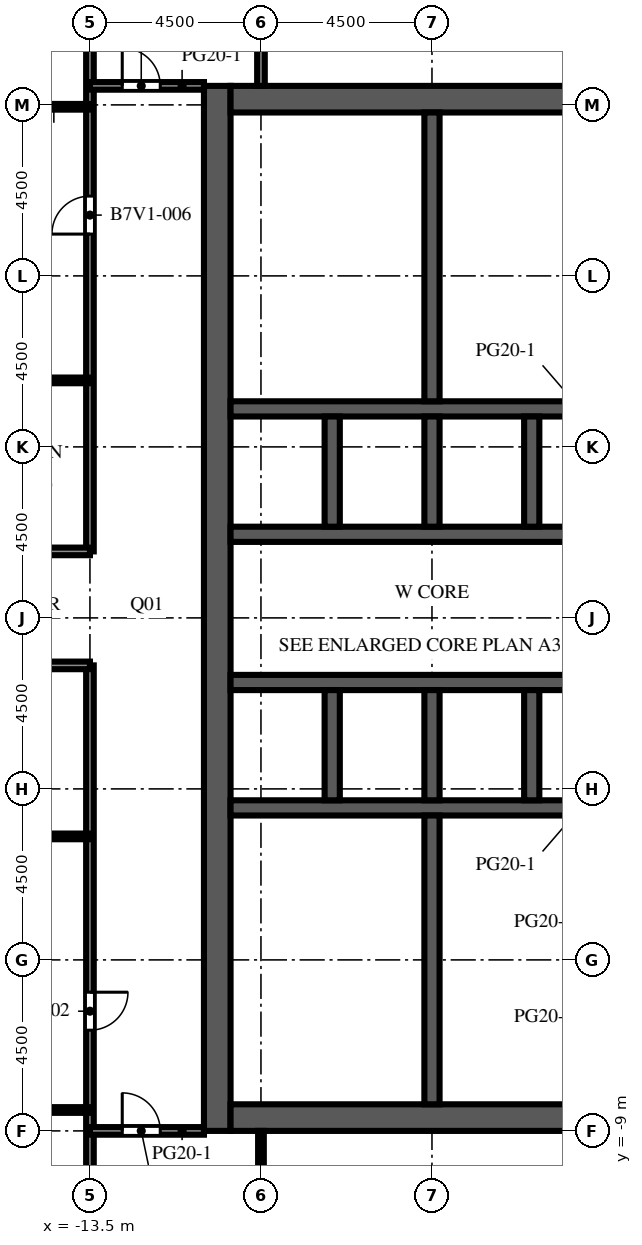
"""IFC4 building model, lengths in metres.
Left out: names, types, materials, properties, quantities, classifications, styles, units other than length and angle.
Written with IfcOpenShell. Run it as: python <this file> out.ifc"""

import sys

from ifc_helpers import new_model, si_unit, direction, frame, frame_2d, origin, place, context, subcontext, project, spatial, rectangle, extrude, element, fill, save


model = new_model("IFC4")
c1 = context("Model", 3, precision=1e-05, world=origin(), true_north=direction((0.0, 1.0)))
c2 = subcontext(c1, "Body", "Model", "MODEL_VIEW")
j1 = project(units=[si_unit("LENGTHUNIT", "METRE"), si_unit("PLANEANGLEUNIT", "RADIAN")], contexts=[c1])
p1 = place(None, origin())
s1 = spatial("IfcSite", under=j1, at=p1, CompositionType="ELEMENT")
p2 = place(p1, origin())
s2 = spatial("IfcBuilding", under=s1, at=p2, CompositionType="ELEMENT")
p3 = place(p2, frame((0.0, 0.0, 252.1)))
s3 = spatial("IfcBuildingStorey", under=s2, at=p3, CompositionType="ELEMENT", Elevation=252.1)
p4 = place(p3, frame((-10.15, -9.0, 0.0), z_axis=(0.0, 0.0, 1.0), x_axis=(0.0, 1.0, 0.0)))
e1 = element("IfcWall", 1, at=p4, inside=s3, PredefinedType="SHEAR", context=c2, shape_type="SweptSolid", body=[
    extrude(rectangle(XDim=27.5, YDim=0.7, at=frame_2d((13.75, 0.0))), origin(), (0.0, 0.0, 1.0), 4.1),
])
p5 = place(p4, frame((12.55, 0.0, 0.0)))
e2 = element("IfcOpeningElement", 2, at=p5, cuts=e1, PredefinedType="OPENING", context=c2, shape_type="SweptSolid", body=[
    extrude(rectangle(XDim=2.4, YDim=2.4, at=frame_2d((1.2, 1.2))), frame((0.0, 0.36, 0.0), z_axis=(0.0, -1.0, 0.0), x_axis=(1.0, 0.0, 0.0)), (0.0, 0.0, 1.0), 0.72),
])
p6 = place(p4, frame((6.825, 0.0, 0.0)))
e3 = element("IfcOpeningElement", 3, at=p6, cuts=e1, PredefinedType="OPENING", context=c2, shape_type="SweptSolid", body=[
    extrude(rectangle(XDim=1.2, YDim=2.1, at=frame_2d((0.6, 1.05))), frame((0.0, 0.36, 0.0), z_axis=(0.0, -1.0, 0.0), x_axis=(1.0, 0.0, 0.0)), (0.0, 0.0, 1.0), 0.72),
])
p7 = place(p4, frame((19.475, 0.0, 0.0)))
e4 = element("IfcOpeningElement", 4, at=p7, cuts=e1, PredefinedType="OPENING", context=c2, shape_type="SweptSolid", body=[
    extrude(rectangle(XDim=1.2, YDim=2.1, at=frame_2d((0.6, 1.05))), frame((0.0, 0.36, 0.0), z_axis=(0.0, -1.0, 0.0), x_axis=(1.0, 0.0, 0.0)), (0.0, 0.0, 1.0), 0.72),
])
for number, where, z_axis, x_axis in (
    (5, (-9.8, -8.65, 0.0), (0.0, 0.0, 1.0), (1.0, 0.0, 0.0)),
    (6, (-9.8, 18.15, 0.0), (0.0, 0.0, 1.0), (1.0, 0.0, 0.0)),
):
    element("IfcWall", number, at=place(p3, frame(where, z_axis=z_axis, x_axis=x_axis)), inside=s3, PredefinedType="SHEAR", context=c2, shape_type="SweptSolid", body=[
        extrude(rectangle(XDim=10.6, YDim=0.7, at=frame_2d((5.3, 0.0))), origin(), (0.0, 0.0, 1.0), 4.1),
    ])
p8 = place(p3, frame((-9.8, -0.5, 0.0), z_axis=(0.0, 0.0, 1.0), x_axis=(1.0, 0.0, 0.0)))
e7 = element("IfcWall", 7, at=p8, inside=s3, PredefinedType="SHEAR", context=c2, shape_type="SweptSolid", body=[
    extrude(rectangle(XDim=10.6, YDim=0.4, at=frame_2d((5.3, 0.0))), origin(), (0.0, 0.0, 1.0), 4.1),
])
p9 = place(p3, frame((-9.8, 2.8, 0.0), z_axis=(0.0, 0.0, 1.0), x_axis=(1.0, 0.0, 0.0)))
e8 = element("IfcWall", 8, at=p9, inside=s3, PredefinedType="SHEAR", context=c2, shape_type="SweptSolid", body=[
    extrude(rectangle(XDim=10.6, YDim=0.4, at=frame_2d((5.3, 0.0))), origin(), (0.0, 0.0, 1.0), 4.1),
])
p10 = place(p9, frame((0.688, 0.0, 0.0)))
e9 = element("IfcOpeningElement", 9, at=p10, cuts=e8, PredefinedType="OPENING", context=c2, shape_type="SweptSolid", body=[
    extrude(rectangle(XDim=1.1, YDim=2.1, at=frame_2d((0.55, 1.05))), frame((0.0, 0.21, 0.0), z_axis=(0.0, -1.0, 0.0), x_axis=(1.0, 0.0, 0.0)), (0.0, 0.0, 1.0), 0.42),
])
p11 = place(p9, frame((3.438, 0.0, 0.0)))
e10 = element("IfcOpeningElement", 10, at=p11, cuts=e8, PredefinedType="OPENING", context=c2, shape_type="SweptSolid", body=[
    extrude(rectangle(XDim=1.1, YDim=2.1, at=frame_2d((0.55, 1.05))), frame((0.0, 0.21, 0.0), z_axis=(0.0, -1.0, 0.0), x_axis=(1.0, 0.0, 0.0)), (0.0, 0.0, 1.0), 0.42),
])
p12 = place(p9, frame((6.113, 0.0, 0.0)))
e11 = element("IfcOpeningElement", 11, at=p12, cuts=e8, PredefinedType="OPENING", context=c2, shape_type="SweptSolid", body=[
    extrude(rectangle(XDim=1.0, YDim=2.1, at=frame_2d((0.5, 1.05))), frame((0.0, 0.21, 0.0), z_axis=(0.0, -1.0, 0.0), x_axis=(1.0, 0.0, 0.0)), (0.0, 0.0, 1.0), 0.42),
])
p13 = place(p9, frame((8.863, 0.0, 0.0)))
e12 = element("IfcOpeningElement", 12, at=p13, cuts=e8, PredefinedType="OPENING", context=c2, shape_type="SweptSolid", body=[
    extrude(rectangle(XDim=1.0, YDim=2.1, at=frame_2d((0.5, 1.05))), frame((0.0, 0.21, 0.0), z_axis=(0.0, -1.0, 0.0), x_axis=(1.0, 0.0, 0.0)), (0.0, 0.0, 1.0), 0.42),
])
p14 = place(p3, frame((-9.8, 6.7, 0.0), z_axis=(0.0, 0.0, 1.0), x_axis=(1.0, 0.0, 0.0)))
e13 = element("IfcWall", 13, at=p14, inside=s3, PredefinedType="SHEAR", context=c2, shape_type="SweptSolid", body=[
    extrude(rectangle(XDim=10.6, YDim=0.4, at=frame_2d((5.3, 0.0))), origin(), (0.0, 0.0, 1.0), 4.1),
])
p15 = place(p14, frame((3.438, 0.0, 0.0)))
e14 = element("IfcOpeningElement", 14, at=p15, cuts=e13, PredefinedType="OPENING", context=c2, shape_type="SweptSolid", body=[
    extrude(rectangle(XDim=1.1, YDim=2.1, at=frame_2d((0.55, 1.05))), frame((0.0, 0.21, 0.0), z_axis=(0.0, -1.0, 0.0), x_axis=(1.0, 0.0, 0.0)), (0.0, 0.0, 1.0), 0.42),
])
p16 = place(p14, frame((6.062, 0.0, 0.0)))
e15 = element("IfcOpeningElement", 15, at=p16, cuts=e13, PredefinedType="OPENING", context=c2, shape_type="SweptSolid", body=[
    extrude(rectangle(XDim=1.1, YDim=2.1, at=frame_2d((0.55, 1.05))), frame((0.0, 0.21, 0.0), z_axis=(0.0, -1.0, 0.0), x_axis=(1.0, 0.0, 0.0)), (0.0, 0.0, 1.0), 0.42),
])
p17 = place(p14, frame((8.812, 0.0, 0.0)))
e16 = element("IfcOpeningElement", 16, at=p17, cuts=e13, PredefinedType="OPENING", context=c2, shape_type="SweptSolid", body=[
    extrude(rectangle(XDim=1.1, YDim=2.1, at=frame_2d((0.55, 1.05))), frame((0.0, 0.21, 0.0), z_axis=(0.0, -1.0, 0.0), x_axis=(1.0, 0.0, 0.0)), (0.0, 0.0, 1.0), 0.42),
])
p18 = place(p14, frame((0.738, 0.0, 0.0)))
e17 = element("IfcOpeningElement", 17, at=p18, cuts=e13, PredefinedType="OPENING", context=c2, shape_type="SweptSolid", body=[
    extrude(rectangle(XDim=1.0, YDim=2.1, at=frame_2d((0.5, 1.05))), frame((0.0, 0.21, 0.0), z_axis=(0.0, -1.0, 0.0), x_axis=(1.0, 0.0, 0.0)), (0.0, 0.0, 1.0), 0.42),
])
p19 = place(p3, frame((-9.8, 10.0, 0.0), z_axis=(0.0, 0.0, 1.0), x_axis=(1.0, 0.0, 0.0)))
e18 = element("IfcWall", 18, at=p19, inside=s3, PredefinedType="SHEAR", context=c2, shape_type="SweptSolid", body=[
    extrude(rectangle(XDim=10.6, YDim=0.4, at=frame_2d((5.3, 0.0))), origin(), (0.0, 0.0, 1.0), 4.1),
])
for number, where, z_axis, x_axis in (
    (19, (-7.125, -0.3, 0.0), (0.0, 0.0, 1.0), (0.0, 1.0, 0.0)),
    (20, (-7.125, 6.9, 0.0), (0.0, 0.0, 1.0), (0.0, 1.0, 0.0)),
    (21, (-4.5, -0.3, 0.0), (0.0, 0.0, 1.0), (0.0, 1.0, 0.0)),
    (22, (-4.5, 6.9, 0.0), (0.0, 0.0, 1.0), (0.0, 1.0, 0.0)),
    (23, (-1.875, -0.3, 0.0), (0.0, 0.0, 1.0), (0.0, 1.0, 0.0)),
    (24, (-1.875, 6.9, 0.0), (0.0, 0.0, 1.0), (0.0, 1.0, 0.0)),
):
    element("IfcWall", number, at=place(p3, frame(where, z_axis=z_axis, x_axis=x_axis)), inside=s3, PredefinedType="SHEAR", context=c2, shape_type="SweptSolid", body=[
        extrude(rectangle(XDim=2.9, YDim=0.4, at=frame_2d((1.45, 0.0))), origin(), (0.0, 0.0, 1.0), 4.1),
    ])
for number, where, z_axis, x_axis in (
    (25, (-4.5, -8.3, 0.0), (0.0, 0.0, 1.0), (0.0, 1.0, 0.0)),
    (26, (-4.5, 10.2, 0.0), (0.0, 0.0, 1.0), (0.0, 1.0, 0.0)),
):
    element("IfcWall", number, at=place(p3, frame(where, z_axis=z_axis, x_axis=x_axis)), inside=s3, PredefinedType="SHEAR", context=c2, shape_type="SweptSolid", body=[
        extrude(rectangle(XDim=7.6, YDim=0.4, at=frame_2d((3.8, 0.0))), origin(), (0.0, 0.0, 1.0), 4.1),
    ])
for number, where, z_axis, x_axis in (
    (27, (-4.3, -5.716, 0.0), (0.0, 0.0, 1.0), (1.0, 0.0, 0.0)),
    (28, (-4.3, -3.588, 0.0), (0.0, 0.0, 1.0), (1.0, 0.0, 0.0)),
):
    element("IfcWall", number, at=place(p3, frame(where, z_axis=z_axis, x_axis=x_axis)), inside=s3, PredefinedType="PARTITIONING", context=c2, shape_type="SweptSolid", body=[
        extrude(rectangle(XDim=3.6, YDim=0.1, at=frame_2d((1.8, 0.0))), origin(), (0.0, 0.0, 1.0), 3.65),
    ])
for number, where, z_axis, x_axis in (
    (29, (-4.3, 12.48, 0.0), (0.0, 0.0, 1.0), (1.0, 0.0, 0.0)),
    (30, (-4.3, 14.912, 0.0), (0.0, 0.0, 1.0), (1.0, 0.0, 0.0)),
):
    element("IfcWall", number, at=place(p3, frame(where, z_axis=z_axis, x_axis=x_axis)), inside=s3, PredefinedType="PARTITIONING", context=c2, shape_type="SweptSolid", body=[
        extrude(rectangle(XDim=3.7, YDim=0.1, at=frame_2d((1.85, 0.0))), origin(), (0.0, 0.0, 1.0), 3.65),
    ])
p20 = place(p3, frame((-13.5, -22.077, 0.0), z_axis=(0.0, 0.0, 1.0), x_axis=(0.0, 1.0, 0.0)))
e31 = element("IfcWall", 31, at=p20, inside=s3, PredefinedType="PARTITIONING", context=c2, shape_type="SweptSolid", body=[
    extrude(rectangle(XDim=25.327, YDim=0.2, at=frame_2d((12.664, 0.0))), origin(), (0.0, 0.0, 1.0), 3.65),
])
p21 = place(p20, frame((15.727, 0.0, 0.0)))
e32 = element("IfcOpeningElement", 32, at=p21, cuts=e31, PredefinedType="OPENING", context=c2, shape_type="SweptSolid", body=[
    extrude(rectangle(XDim=1.0, YDim=2.1, at=frame_2d((0.5, 1.05))), frame((0.0, 0.11, 0.0), z_axis=(0.0, -1.0, 0.0), x_axis=(1.0, 0.0, 0.0)), (0.0, 0.0, 1.0), 0.22),
])
p22 = place(p3, frame((-13.5, 6.25, 0.0), z_axis=(0.0, 0.0, 1.0), x_axis=(0.0, 1.0, 0.0)))
e33 = element("IfcWall", 33, at=p22, inside=s3, PredefinedType="PARTITIONING", context=c2, shape_type="SweptSolid", body=[
    extrude(rectangle(XDim=24.827, YDim=0.2, at=frame_2d((12.414, 0.0))), origin(), (0.0, 0.0, 1.0), 3.65),
])
p23 = place(p22, frame((8.35, 0.0, 0.0)))
e34 = element("IfcOpeningElement", 34, at=p23, cuts=e33, PredefinedType="OPENING", context=c2, shape_type="SweptSolid", body=[
    extrude(rectangle(XDim=1.0, YDim=2.1, at=frame_2d((0.5, 1.05))), frame((0.0, 0.11, 0.0), z_axis=(0.0, -1.0, 0.0), x_axis=(1.0, 0.0, 0.0)), (0.0, 0.0, 1.0), 0.22),
])
p24 = place(p3, frame((-9.0, -17.5, 0.0), z_axis=(0.0, 0.0, 1.0), x_axis=(0.0, 1.0, 0.0)))
e35 = element("IfcWall", 35, at=p24, inside=s3, PredefinedType="PARTITIONING", context=c2, shape_type="SweptSolid", body=[
    extrude(rectangle(XDim=8.5, YDim=0.15, at=frame_2d((4.25, 0.0))), origin(), (0.0, 0.0, 1.0), 3.65),
])
p25 = place(p3, frame((-9.0, 18.5, 0.0), z_axis=(0.0, 0.0, 1.0), x_axis=(0.0, 1.0, 0.0)))
e36 = element("IfcWall", 36, at=p25, inside=s3, PredefinedType="PARTITIONING", context=c2, shape_type="SweptSolid", body=[
    extrude(rectangle(XDim=3.5, YDim=0.2, at=frame_2d((1.75, 0.0))), origin(), (0.0, 0.0, 1.0), 3.65),
])
p26 = place(p3, frame((-10.5, -9.0, 0.0), z_axis=(0.0, 0.0, 1.0), x_axis=(-1.0, 0.0, 0.0)))
e37 = element("IfcWall", 37, at=p26, inside=s3, PredefinedType="PARTITIONING", context=c2, shape_type="SweptSolid", body=[
    extrude(rectangle(XDim=3.0, YDim=0.2, at=frame_2d((1.5, 0.0))), origin(), (0.0, 0.0, 1.0), 3.65),
])
p27 = place(p26, frame((1.15, 0.0, 0.0)))
e38 = element("IfcOpeningElement", 38, at=p27, cuts=e37, PredefinedType="OPENING", context=c2, shape_type="SweptSolid", body=[
    extrude(rectangle(XDim=1.0, YDim=2.1, at=frame_2d((0.5, 1.05))), frame((0.0, 0.11, 0.0), z_axis=(0.0, -1.0, 0.0), x_axis=(1.0, 0.0, 0.0)), (0.0, 0.0, 1.0), 0.22),
])
p28 = place(p3, frame((-13.5, -8.45, 0.0), z_axis=(0.0, 0.0, 1.0), x_axis=(-1.0, 0.0, 0.0)))
e39 = element("IfcWall", 39, at=p28, inside=s3, PredefinedType="PARTITIONING", context=c2, shape_type="SweptSolid", body=[
    extrude(rectangle(XDim=4.35, YDim=0.15, at=frame_2d((2.175, 0.0))), origin(), (0.0, 0.0, 1.0), 3.65),
])
p29 = place(p28, frame((2.15, 0.0, 0.0)))
e40 = element("IfcOpeningElement", 40, at=p29, cuts=e39, PredefinedType="OPENING", context=c2, shape_type="SweptSolid", body=[
    extrude(rectangle(XDim=1.0, YDim=2.1, at=frame_2d((0.5, 1.05))), frame((0.0, 0.085, 0.0), z_axis=(0.0, -1.0, 0.0), x_axis=(1.0, 0.0, 0.0)), (0.0, 0.0, 1.0), 0.17),
])
p30 = place(p3, frame((-17.85, -1.25, 0.0), z_axis=(0.0, 0.0, 1.0), x_axis=(1.0, 0.0, 0.0)))
e41 = element("IfcWall", 41, at=p30, inside=s3, PredefinedType="PARTITIONING", context=c2, shape_type="SweptSolid", body=[
    extrude(rectangle(XDim=4.35, YDim=0.15, at=frame_2d((2.175, 0.0))), origin(), (0.0, 0.0, 1.0), 3.65),
])
p31 = place(p30, frame((1.7, 0.0, 0.0)))
e42 = element("IfcOpeningElement", 42, at=p31, cuts=e41, PredefinedType="OPENING", context=c2, shape_type="SweptSolid", body=[
    extrude(rectangle(XDim=1.0, YDim=2.1, at=frame_2d((0.5, 1.05))), frame((0.0, 0.085, 0.0), z_axis=(0.0, -1.0, 0.0), x_axis=(1.0, 0.0, 0.0)), (0.0, 0.0, 1.0), 0.17),
])
for number, where, z_axis, x_axis in (
    (43, (-17.85, 3.25, 0.0), (0.0, 0.0, 1.0), (1.0, 0.0, 0.0)),
    (44, (-17.85, 6.25, 0.0), (0.0, 0.0, 1.0), (1.0, 0.0, 0.0)),
):
    element("IfcWall", number, at=place(p3, frame(where, z_axis=z_axis, x_axis=x_axis)), inside=s3, PredefinedType="PARTITIONING", context=c2, shape_type="SweptSolid", body=[
        extrude(rectangle(XDim=4.35, YDim=0.2, at=frame_2d((2.175, 0.0))), origin(), (0.0, 0.0, 1.0), 3.65),
    ])
p32 = place(p3, frame((-13.5, 10.75, 0.0), z_axis=(0.0, 0.0, 1.0), x_axis=(-1.0, 0.0, 0.0)))
e45 = element("IfcWall", 45, at=p32, inside=s3, PredefinedType="PARTITIONING", context=c2, shape_type="SweptSolid", body=[
    extrude(rectangle(XDim=4.35, YDim=0.15, at=frame_2d((2.175, 0.0))), origin(), (0.0, 0.0, 1.0), 3.65),
])
p33 = place(p32, frame((1.65, 0.0, 0.0)))
e46 = element("IfcOpeningElement", 46, at=p33, cuts=e45, PredefinedType="OPENING", context=c2, shape_type="SweptSolid", body=[
    extrude(rectangle(XDim=1.0, YDim=2.1, at=frame_2d((0.5, 1.05))), frame((0.0, 0.085, 0.0), z_axis=(0.0, -1.0, 0.0), x_axis=(1.0, 0.0, 0.0)), (0.0, 0.0, 1.0), 0.17),
])
p34 = place(p3, frame((-17.6, 17.95, 0.0), z_axis=(0.0, 0.0, 1.0), x_axis=(1.0, 0.0, 0.0)))
e47 = element("IfcWall", 47, at=p34, inside=s3, PredefinedType="PARTITIONING", context=c2, shape_type="SweptSolid", body=[
    extrude(rectangle(XDim=4.1, YDim=0.15, at=frame_2d((2.05, 0.0))), origin(), (0.0, 0.0, 1.0), 3.65),
])
p35 = place(p34, frame((1.2, 0.0, 0.0)))
e48 = element("IfcOpeningElement", 48, at=p35, cuts=e47, PredefinedType="OPENING", context=c2, shape_type="SweptSolid", body=[
    extrude(rectangle(XDim=1.0, YDim=2.1, at=frame_2d((0.5, 1.05))), frame((0.0, 0.085, 0.0), z_axis=(0.0, -1.0, 0.0), x_axis=(1.0, 0.0, 0.0)), (0.0, 0.0, 1.0), 0.17),
])
p36 = place(p3, frame((-13.5, 18.5, 0.0), z_axis=(0.0, 0.0, 1.0), x_axis=(1.0, 0.0, 0.0)))
e49 = element("IfcWall", 49, at=p36, inside=s3, PredefinedType="PARTITIONING", context=c2, shape_type="SweptSolid", body=[
    extrude(rectangle(XDim=3.0, YDim=0.2, at=frame_2d((1.5, 0.0))), origin(), (0.0, 0.0, 1.0), 3.65),
])
p37 = place(p36, frame((0.85, 0.0, 0.0)))
e50 = element("IfcOpeningElement", 50, at=p37, cuts=e49, PredefinedType="OPENING", context=c2, shape_type="SweptSolid", body=[
    extrude(rectangle(XDim=1.0, YDim=2.1, at=frame_2d((0.5, 1.05))), frame((0.0, 0.11, 0.0), z_axis=(0.0, -1.0, 0.0), x_axis=(1.0, 0.0, 0.0)), (0.0, 0.0, 1.0), 0.22),
])
p38 = place(p10, origin())
e51 = element("IfcDoor", 51, at=p38, inside=s3, OperationType="DOUBLE_DOOR_SLIDING", PredefinedType="DOOR", context=c2, shape_type="SweptSolid", body=[
    extrude(rectangle(XDim=1.1, YDim=2.1, at=frame_2d((0.55, 1.05))), frame((0.0, 0.025, 0.0), z_axis=(0.0, -1.0, 0.0), x_axis=(1.0, 0.0, 0.0)), (0.0, 0.0, 1.0), 0.05),
])
fill(e9, e51)
p39 = place(p11, origin())
e52 = element("IfcDoor", 52, at=p39, inside=s3, OperationType="DOUBLE_DOOR_SLIDING", PredefinedType="DOOR", context=c2, shape_type="SweptSolid", body=[
    extrude(rectangle(XDim=1.1, YDim=2.1, at=frame_2d((0.55, 1.05))), frame((0.0, 0.025, 0.0), z_axis=(0.0, -1.0, 0.0), x_axis=(1.0, 0.0, 0.0)), (0.0, 0.0, 1.0), 0.05),
])
fill(e10, e52)
p40 = place(p15, origin())
e53 = element("IfcDoor", 53, at=p40, inside=s3, OperationType="DOUBLE_DOOR_SLIDING", PredefinedType="DOOR", context=c2, shape_type="SweptSolid", body=[
    extrude(rectangle(XDim=1.1, YDim=2.1, at=frame_2d((0.55, 1.05))), frame((0.0, 0.025, 0.0), z_axis=(0.0, -1.0, 0.0), x_axis=(1.0, 0.0, 0.0)), (0.0, 0.0, 1.0), 0.05),
])
fill(e14, e53)
p41 = place(p16, origin())
e54 = element("IfcDoor", 54, at=p41, inside=s3, OperationType="DOUBLE_DOOR_SLIDING", PredefinedType="DOOR", context=c2, shape_type="SweptSolid", body=[
    extrude(rectangle(XDim=1.1, YDim=2.1, at=frame_2d((0.55, 1.05))), frame((0.0, 0.025, 0.0), z_axis=(0.0, -1.0, 0.0), x_axis=(1.0, 0.0, 0.0)), (0.0, 0.0, 1.0), 0.05),
])
fill(e15, e54)
p42 = place(p5, origin())
e55 = element("IfcDoor", 55, at=p42, inside=s3, OperationType="DOUBLE_DOOR_DOUBLE_SWING", PredefinedType="DOOR", context=c2, shape_type="SweptSolid", body=[
    extrude(rectangle(XDim=2.4, YDim=2.4, at=frame_2d((1.2, 1.2))), frame((0.0, 0.025, 0.0), z_axis=(0.0, -1.0, 0.0), x_axis=(1.0, 0.0, 0.0)), (0.0, 0.0, 1.0), 0.05),
])
fill(e2, e55)
p43 = place(p6, origin())
e56 = element("IfcDoor", 56, at=p43, inside=s3, OperationType="SINGLE_SWING_LEFT", PredefinedType="DOOR", context=c2, shape_type="SweptSolid", body=[
    extrude(rectangle(XDim=1.2, YDim=2.1, at=frame_2d((0.6, 1.05))), frame((0.0, 0.025, 0.0), z_axis=(0.0, -1.0, 0.0), x_axis=(1.0, 0.0, 0.0)), (0.0, 0.0, 1.0), 0.05),
])
fill(e3, e56)
p44 = place(p7, origin())
e57 = element("IfcDoor", 57, at=p44, inside=s3, OperationType="SINGLE_SWING_LEFT", PredefinedType="DOOR", context=c2, shape_type="SweptSolid", body=[
    extrude(rectangle(XDim=1.2, YDim=2.1, at=frame_2d((0.6, 1.05))), frame((0.0, 0.025, 0.0), z_axis=(0.0, -1.0, 0.0), x_axis=(1.0, 0.0, 0.0)), (0.0, 0.0, 1.0), 0.05),
])
fill(e4, e57)
p45 = place(p12, origin())
e58 = element("IfcDoor", 58, at=p45, inside=s3, OperationType="SINGLE_SWING_LEFT", PredefinedType="DOOR", context=c2, shape_type="SweptSolid", body=[
    extrude(rectangle(XDim=1.0, YDim=2.1, at=frame_2d((0.5, 1.05))), frame((0.0, 0.025, 0.0), z_axis=(0.0, -1.0, 0.0), x_axis=(1.0, 0.0, 0.0)), (0.0, 0.0, 1.0), 0.05),
])
fill(e11, e58)
p46 = place(p18, origin())
e59 = element("IfcDoor", 59, at=p46, inside=s3, OperationType="SINGLE_SWING_LEFT", PredefinedType="DOOR", context=c2, shape_type="SweptSolid", body=[
    extrude(rectangle(XDim=1.0, YDim=2.1, at=frame_2d((0.5, 1.05))), frame((0.0, 0.025, 0.0), z_axis=(0.0, -1.0, 0.0), x_axis=(1.0, 0.0, 0.0)), (0.0, 0.0, 1.0), 0.05),
])
fill(e17, e59)
p47 = place(p21, origin())
e60 = element("IfcDoor", 60, at=p47, inside=s3, OperationType="SINGLE_SWING_RIGHT", PredefinedType="DOOR", context=c2, shape_type="SweptSolid", body=[
    extrude(rectangle(XDim=1.0, YDim=2.1, at=frame_2d((0.5, 1.05))), frame((0.0, 0.025, 0.0), z_axis=(0.0, -1.0, 0.0), x_axis=(1.0, 0.0, 0.0)), (0.0, 0.0, 1.0), 0.05),
])
fill(e32, e60)
p48 = place(p23, origin())
e61 = element("IfcDoor", 61, at=p48, inside=s3, OperationType="SINGLE_SWING_LEFT", PredefinedType="DOOR", context=c2, shape_type="SweptSolid", body=[
    extrude(rectangle(XDim=1.0, YDim=2.1, at=frame_2d((0.5, 1.05))), frame((0.0, 0.025, 0.0), z_axis=(0.0, -1.0, 0.0), x_axis=(1.0, 0.0, 0.0)), (0.0, 0.0, 1.0), 0.05),
])
fill(e34, e61)
p49 = place(p27, origin())
e62 = element("IfcDoor", 62, at=p49, inside=s3, OperationType="SINGLE_SWING_RIGHT", PredefinedType="DOOR", context=c2, shape_type="SweptSolid", body=[
    extrude(rectangle(XDim=1.0, YDim=2.1, at=frame_2d((0.5, 1.05))), frame((0.0, 0.025, 0.0), z_axis=(0.0, -1.0, 0.0), x_axis=(1.0, 0.0, 0.0)), (0.0, 0.0, 1.0), 0.05),
])
fill(e38, e62)
p50 = place(p37, origin())
e63 = element("IfcDoor", 63, at=p50, inside=s3, OperationType="SINGLE_SWING_LEFT", PredefinedType="DOOR", context=c2, shape_type="SweptSolid", body=[
    extrude(rectangle(XDim=1.0, YDim=2.1, at=frame_2d((0.5, 1.05))), frame((0.0, 0.025, 0.0), z_axis=(0.0, -1.0, 0.0), x_axis=(1.0, 0.0, 0.0)), (0.0, 0.0, 1.0), 0.05),
])
fill(e50, e63)
save(model, sys.argv[1])
